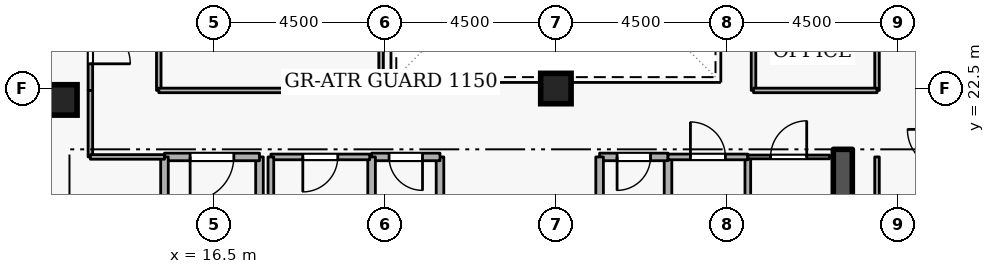
"""IFC4 building model, lengths in metres.
Left out: names, types, materials, properties, quantities, classifications, styles, units other than length and angle.
Written with IfcOpenShell. Run it as: python <this file> out.ifc"""

import sys

from ifc_helpers import new_model, si_unit, direction, frame, frame_2d, origin, origin_2d, place, context, subcontext, project, spatial, rectangle, extrude, element, fill, save


model = new_model("IFC4")
c1 = context("Model", 3, precision=1e-05, world=origin(), true_north=direction((0.0, 1.0)))
c2 = subcontext(c1, "Body", "Model", "MODEL_VIEW")
j1 = project(units=[si_unit("LENGTHUNIT", "METRE"), si_unit("PLANEANGLEUNIT", "RADIAN")], contexts=[c1])
p1 = place(None, origin())
s1 = spatial("IfcSite", under=j1, at=p1, CompositionType="ELEMENT")
p2 = place(p1, origin())
s2 = spatial("IfcBuilding", under=s1, at=p2, CompositionType="ELEMENT")
p3 = place(p2, frame((0.0, 0.0, 254.7)))
s3 = spatial("IfcBuildingStorey", under=s2, at=p3, CompositionType="ELEMENT", Elevation=254.7)
p4 = place(p3, frame((33.05, 15.1, 0.0), z_axis=(0.0, 0.0, 1.0), x_axis=(0.0, 1.0, 0.0)))
e1 = element("IfcWall", 1, at=p4, inside=s3, PredefinedType="SHEAR", context=c2, shape_type="SweptSolid", body=[
    extrude(rectangle(XDim=5.8, YDim=0.5, at=frame_2d((2.9, 0.0))), origin(), (0.0, 0.0, 1.0), 3.6),
])
for number, where, z_axis, x_axis in (
    (2, (12.5, 22.2, 0.0), (0.0, 0.0, 1.0), (1.0, 0.0, 0.0)),
    (3, (25.5, 22.5, 0.0), (0.0, 0.0, 1.0), (1.0, 0.0, 0.0)),
):
    element("IfcColumn", number, at=place(p3, frame(where, z_axis=z_axis, x_axis=x_axis)), inside=s3, PredefinedType="COLUMN", context=c2, shape_type="SweptSolid", body=[
        extrude(rectangle(XDim=0.8, YDim=0.8, at=origin_2d()), origin(), (0.0, 0.0, 1.0), 3.6),
    ])
p5 = place(p3, frame((17.7, 18.4, 0.0), z_axis=(0.0, 0.0, 1.0), x_axis=(0.0, 1.0, 0.0)))
e4 = element("IfcWall", 4, at=p5, inside=s3, PredefinedType="STANDARD", context=c2, shape_type="SweptSolid", body=[
    extrude(rectangle(XDim=2.3, YDim=0.2, at=frame_2d((1.15, 0.0))), origin(), (0.0, 0.0, 1.0), 2.525),
])
p6 = place(p3, frame((17.7, 20.7, 0.0), z_axis=(0.0, 0.0, 1.0), x_axis=(-1.0, 0.0, 0.0)))
e5 = element("IfcWall", 5, at=p6, inside=s3, PredefinedType="STANDARD", context=c2, shape_type="SweptSolid", body=[
    extrude(rectangle(XDim=2.5, YDim=0.2, at=frame_2d((1.25, 0.0))), origin(), (0.0, 0.0, 1.0), 3.32),
])
p7 = place(p6, frame((0.675, 0.0, 0.0)))
e6 = element("IfcOpeningElement", 6, at=p7, cuts=e5, PredefinedType="OPENING", context=c2, shape_type="SweptSolid", body=[
    extrude(rectangle(XDim=1.15, YDim=2.1, at=frame_2d((0.575, 1.05))), frame((0.0, 0.11, 0.0), z_axis=(0.0, -1.0, 0.0), x_axis=(1.0, 0.0, 0.0)), (0.0, 0.0, 1.0), 0.22),
])
p8 = place(p3, frame((15.2, 20.7, 0.0), z_axis=(0.0, 0.0, 1.0), x_axis=(0.0, -1.0, 0.0)))
e7 = element("IfcWall", 7, at=p8, inside=s3, PredefinedType="STANDARD", context=c2, shape_type="SweptSolid", body=[
    extrude(rectangle(XDim=5.7, YDim=0.2, at=frame_2d((2.85, 0.0))), origin(), (0.0, 0.0, 1.0), 3.32),
])
p9 = place(p3, frame((28.45, 18.65, 0.0), z_axis=(0.0, 0.0, 1.0), x_axis=(0.0, 1.0, 0.0)))
e8 = element("IfcWall", 8, at=p9, inside=s3, PredefinedType="STANDARD", context=c2, shape_type="SweptSolid", body=[
    extrude(rectangle(XDim=2.05, YDim=0.2, at=frame_2d((1.025, 0.0))), origin(), (0.0, 0.0, 1.0), 3.32),
])
p10 = place(p3, frame((28.45, 20.7, 0.0), z_axis=(0.0, 0.0, 1.0), x_axis=(-1.0, 0.0, 0.0)))
e9 = element("IfcWall", 9, at=p10, inside=s3, PredefinedType="STANDARD", context=c2, shape_type="SweptSolid", body=[
    extrude(rectangle(XDim=1.8, YDim=0.2, at=frame_2d((0.9, 0.0))), origin(), (0.0, 0.0, 1.0), 3.32),
])
p11 = place(p10, frame((0.46, 0.0, 0.0)))
e10 = element("IfcOpeningElement", 10, at=p11, cuts=e9, PredefinedType="OPENING", context=c2, shape_type="SweptSolid", body=[
    extrude(rectangle(XDim=0.88, YDim=2.04, at=frame_2d((0.44, 1.02))), frame((0.0, 0.11, 0.0), z_axis=(0.0, -1.0, 0.0), x_axis=(1.0, 0.0, 0.0)), (0.0, 0.0, 1.0), 0.22),
])
for number, where, z_axis, x_axis in (
    (11, (26.65, 20.7, 0.0), (0.0, 0.0, 1.0), (0.0, -1.0, 0.0)),
    (12, (22.45, 18.65, 0.0), (0.0, 0.0, 1.0), (0.0, 1.0, 0.0)),
):
    element("IfcWall", number, at=place(p3, frame(where, z_axis=z_axis, x_axis=x_axis)), inside=s3, PredefinedType="STANDARD", context=c2, shape_type="SweptSolid", body=[
        extrude(rectangle(XDim=2.05, YDim=0.2, at=frame_2d((1.025, 0.0))), origin(), (0.0, 0.0, 1.0), 3.32),
    ])
p12 = place(p3, frame((22.45, 20.7, 0.0), z_axis=(0.0, 0.0, 1.0), x_axis=(-1.0, 0.0, 0.0)))
e13 = element("IfcWall", 13, at=p12, inside=s3, PredefinedType="STANDARD", context=c2, shape_type="SweptSolid", body=[
    extrude(rectangle(XDim=1.8, YDim=0.2, at=frame_2d((0.9, 0.0))), origin(), (0.0, 0.0, 1.0), 3.32),
])
p13 = place(p12, frame((0.46, 0.0, 0.0)))
e14 = element("IfcOpeningElement", 14, at=p13, cuts=e13, PredefinedType="OPENING", context=c2, shape_type="SweptSolid", body=[
    extrude(rectangle(XDim=0.88, YDim=2.04, at=frame_2d((0.44, 1.02))), frame((0.0, 0.11, 0.0), z_axis=(0.0, -1.0, 0.0), x_axis=(1.0, 0.0, 0.0)), (0.0, 0.0, 1.0), 0.22),
])
p14 = place(p3, frame((20.65, 20.7, 0.0), z_axis=(0.0, 0.0, 1.0), x_axis=(0.0, -1.0, 0.0)))
e15 = element("IfcWall", 15, at=p14, inside=s3, PredefinedType="STANDARD", context=c2, shape_type="SweptSolid", body=[
    extrude(rectangle(XDim=2.05, YDim=0.2, at=frame_2d((1.025, 0.0))), origin(), (0.0, 0.0, 1.0), 3.32),
])
p15 = place(p3, frame((20.6, 20.7, 0.0), z_axis=(0.0, 0.0, 1.0), x_axis=(-1.0, 0.0, 0.0)))
e16 = element("IfcWall", 16, at=p15, inside=s3, PredefinedType="PARTITIONING", context=c2, shape_type="SweptSolid", body=[
    extrude(rectangle(XDim=2.6, YDim=0.15, at=frame_2d((1.3, 0.0))), origin(), (0.0, 0.0, 1.0), 3.32),
])
p16 = place(p15, frame((0.84, 0.0, 0.0)))
e17 = element("IfcOpeningElement", 17, at=p16, cuts=e16, PredefinedType="OPENING", context=c2, shape_type="SweptSolid", body=[
    extrude(rectangle(XDim=0.92, YDim=2.08, at=frame_2d((0.46, 1.04))), frame((0.0, 0.085, 0.0), z_axis=(0.0, -1.0, 0.0), x_axis=(1.0, 0.0, 0.0)), (0.0, 0.0, 1.0), 0.17),
])
p17 = place(p3, frame((18.0, 20.7, 0.0), z_axis=(0.0, 0.0, 1.0), x_axis=(0.0, -1.0, 0.0)))
e18 = element("IfcWall", 18, at=p17, inside=s3, PredefinedType="PARTITIONING", context=c2, shape_type="SweptSolid", body=[
    extrude(rectangle(XDim=2.05, YDim=0.15, at=frame_2d((1.025, 0.0))), origin(), (0.0, 0.0, 1.0), 2.525),
])
p18 = place(p3, frame((30.55, 20.7, 0.0), z_axis=(0.0, 0.0, 1.0), x_axis=(0.0, -1.0, 0.0)))
e19 = element("IfcWall", 19, at=p18, inside=s3, PredefinedType="PARTITIONING", context=c2, shape_type="SweptSolid", body=[
    extrude(rectangle(XDim=2.05, YDim=0.15, at=frame_2d((1.025, 0.0))), origin(), (0.0, 0.0, 1.0), 3.32),
])
p19 = place(p3, frame((28.45, 20.7, 0.0), z_axis=(0.0, 0.0, 1.0), x_axis=(1.0, 0.0, 0.0)))
e20 = element("IfcWall", 20, at=p19, inside=s3, PredefinedType="PARTITIONING", context=c2, shape_type="SweptSolid", body=[
    extrude(rectangle(XDim=2.1, YDim=0.15, at=frame_2d((1.05, 0.0))), origin(), (0.0, 0.0, 1.0), 3.32),
])
p20 = place(p19, frame((0.59, 0.0, 0.0)))
e21 = element("IfcOpeningElement", 21, at=p20, cuts=e20, PredefinedType="OPENING", context=c2, shape_type="SweptSolid", body=[
    extrude(rectangle(XDim=0.92, YDim=2.08, at=frame_2d((0.46, 1.04))), frame((0.0, 0.085, 0.0), z_axis=(0.0, -1.0, 0.0), x_axis=(1.0, 0.0, 0.0)), (0.0, 0.0, 1.0), 0.17),
])
p21 = place(p3, frame((30.55, 20.7, 0.0), z_axis=(0.0, 0.0, 1.0), x_axis=(1.0, 0.0, 0.0)))
e22 = element("IfcWall", 22, at=p21, inside=s3, PredefinedType="PARTITIONING", context=c2, shape_type="SweptSolid", body=[
    extrude(rectangle(XDim=2.15, YDim=0.1, at=frame_2d((1.075, 0.0))), origin(), (0.0, 0.0, 1.0), 3.32),
])
p22 = place(p21, frame((0.6, 0.0, 0.0)))
e23 = element("IfcOpeningElement", 23, at=p22, cuts=e22, PredefinedType="OPENING", context=c2, shape_type="SweptSolid", body=[
    extrude(rectangle(XDim=0.95, YDim=2.1, at=frame_2d((0.475, 1.05))), frame((0.0, 0.06, 0.0), z_axis=(0.0, -1.0, 0.0), x_axis=(1.0, 0.0, 0.0)), (0.0, 0.0, 1.0), 0.12),
])
p23 = place(p3, frame((33.95, 20.7, 0.0), z_axis=(0.0, 0.0, 1.0), x_axis=(0.0, -1.0, 0.0)))
e24 = element("IfcWall", 24, at=p23, inside=s3, PredefinedType="PARTITIONING", context=c2, shape_type="SweptSolid", body=[
    extrude(rectangle(XDim=5.9, YDim=0.12, at=frame_2d((2.95, 0.0))), origin(), (0.0, 0.0, 1.0), 3.32),
])
p24 = place(p3, frame((13.25, 24.9, 0.0), z_axis=(0.0, 0.0, 1.0), x_axis=(0.0, -1.0, 0.0)))
e25 = element("IfcWall", 25, at=p24, inside=s3, PredefinedType="PARTITIONING", context=c2, shape_type="SweptSolid", body=[
    extrude(rectangle(XDim=2.45, YDim=0.12, at=frame_2d((1.225, 0.0))), origin(), (0.0, 0.0, 1.0), 3.32),
])
p25 = place(p24, frame((0.7, 0.0, 0.0)))
e26 = element("IfcOpeningElement", 26, at=p25, cuts=e25, PredefinedType="OPENING", context=c2, shape_type="SweptSolid", body=[
    extrude(rectangle(XDim=1.05, YDim=2.1, at=frame_2d((0.525, 1.05))), frame((0.0, 0.07, 0.0), z_axis=(0.0, -1.0, 0.0), x_axis=(1.0, 0.0, 0.0)), (0.0, 0.0, 1.0), 0.14),
])
p26 = place(p3, frame((13.25, 22.45, 0.0), z_axis=(0.0, 0.0, 1.0), x_axis=(0.0, -1.0, 0.0)))
e27 = element("IfcWall", 27, at=p26, inside=s3, PredefinedType="PARTITIONING", context=c2, shape_type="SweptSolid", body=[
    extrude(rectangle(XDim=1.75, YDim=0.12, at=frame_2d((0.875, 0.0))), origin(), (0.0, 0.0, 1.0), 3.32),
])
p27 = place(p3, frame((13.25, 20.7, 0.0), z_axis=(0.0, 0.0, 1.0), x_axis=(1.0, 0.0, 0.0)))
e28 = element("IfcWall", 28, at=p27, inside=s3, PredefinedType="PARTITIONING", context=c2, shape_type="SweptSolid", body=[
    extrude(rectangle(XDim=1.95, YDim=0.12, at=frame_2d((0.975, 0.0))), origin(), (0.0, 0.0, 1.0), 3.32),
])
p28 = place(p3, frame((15.05, 22.45, 0.0), z_axis=(0.0, 0.0, 1.0), x_axis=(0.0, 1.0, 0.0)))
e29 = element("IfcWall", 29, at=p28, inside=s3, PredefinedType="PARTITIONING", context=c2, shape_type="SweptSolid", body=[
    extrude(rectangle(XDim=9.1, YDim=0.12, at=frame_2d((4.55, 0.0))), origin(), (0.0, 0.0, 1.0), 3.32),
])
p29 = place(p28, frame((4.075, 0.0, 0.0)))
e30 = element("IfcOpeningElement", 30, at=p29, cuts=e29, PredefinedType="OPENING", context=c2, shape_type="SweptSolid", body=[
    extrude(rectangle(XDim=0.95, YDim=2.1, at=frame_2d((0.475, 1.05))), frame((0.0, 0.07, 0.0), z_axis=(0.0, -1.0, 0.0), x_axis=(1.0, 0.0, 0.0)), (0.0, 0.0, 1.0), 0.14),
])
p30 = place(p3, frame((20.9, 31.55, 0.0), z_axis=(0.0, 0.0, 1.0), x_axis=(0.0, -1.0, 0.0)))
e31 = element("IfcWall", 31, at=p30, inside=s3, PredefinedType="PARTITIONING", context=c2, shape_type="SweptSolid", body=[
    extrude(rectangle(XDim=9.1, YDim=0.12, at=frame_2d((4.55, 0.0))), origin(), (0.0, 0.0, 1.0), 3.32),
])
p31 = place(p3, frame((20.9, 22.45, 0.0), z_axis=(0.0, 0.0, 1.0), x_axis=(-1.0, 0.0, 0.0)))
e32 = element("IfcWall", 32, at=p31, inside=s3, PredefinedType="PARTITIONING", context=c2, shape_type="SweptSolid", body=[
    extrude(rectangle(XDim=5.85, YDim=0.12, at=frame_2d((2.925, 0.0))), origin(), (0.0, 0.0, 1.0), 3.32),
])
p32 = place(p3, frame((30.7, 22.45, 0.0), z_axis=(0.0, 0.0, 1.0), x_axis=(0.0, 1.0, 0.0)))
e33 = element("IfcWall", 33, at=p32, inside=s3, PredefinedType="PARTITIONING", context=c2, shape_type="SweptSolid", body=[
    extrude(rectangle(XDim=9.1, YDim=0.12, at=frame_2d((4.55, 0.0))), origin(), (0.0, 0.0, 1.0), 3.32),
])
p33 = place(p3, frame((33.95, 31.55, 0.0), z_axis=(0.0, 0.0, 1.0), x_axis=(0.0, -1.0, 0.0)))
e34 = element("IfcWall", 34, at=p33, inside=s3, PredefinedType="PARTITIONING", context=c2, shape_type="SweptSolid", body=[
    extrude(rectangle(XDim=9.1, YDim=0.12, at=frame_2d((4.55, 0.0))), origin(), (0.0, 0.0, 1.0), 3.32),
])
p34 = place(p33, frame((4.075, 0.0, 0.0)))
e35 = element("IfcOpeningElement", 35, at=p34, cuts=e34, PredefinedType="OPENING", context=c2, shape_type="SweptSolid", body=[
    extrude(rectangle(XDim=0.95, YDim=2.1, at=frame_2d((0.475, 1.05))), frame((0.0, 0.07, 0.0), z_axis=(0.0, -1.0, 0.0), x_axis=(1.0, 0.0, 0.0)), (0.0, 0.0, 1.0), 0.14),
])
p35 = place(p3, frame((33.95, 22.45, 0.0), z_axis=(0.0, 0.0, 1.0), x_axis=(-1.0, 0.0, 0.0)))
e36 = element("IfcWall", 36, at=p35, inside=s3, PredefinedType="PARTITIONING", context=c2, shape_type="SweptSolid", body=[
    extrude(rectangle(XDim=3.25, YDim=0.12, at=frame_2d((1.625, 0.0))), origin(), (0.0, 0.0, 1.0), 3.32),
])
p36 = place(p7, origin())
e37 = element("IfcDoor", 37, at=p36, inside=s3, OperationType="SINGLE_SWING_RIGHT", PredefinedType="DOOR", context=c2, shape_type="SweptSolid", body=[
    extrude(rectangle(XDim=1.15, YDim=2.1, at=frame_2d((0.575, 1.05))), frame((0.0, 0.025, 0.0), z_axis=(0.0, -1.0, 0.0), x_axis=(1.0, 0.0, 0.0)), (0.0, 0.0, 1.0), 0.05),
])
fill(e6, e37)
p37 = place(p11, origin())
e38 = element("IfcDoor", 38, at=p37, inside=s3, OperationType="SINGLE_SWING_RIGHT", PredefinedType="DOOR", context=c2, shape_type="SweptSolid", body=[
    extrude(rectangle(XDim=0.88, YDim=2.04, at=frame_2d((0.44, 1.02))), frame((0.0, 0.025, 0.0), z_axis=(0.0, -1.0, 0.0), x_axis=(1.0, 0.0, 0.0)), (0.0, 0.0, 1.0), 0.05),
])
fill(e10, e38)
p38 = place(p13, origin())
e39 = element("IfcDoor", 39, at=p38, inside=s3, OperationType="SINGLE_SWING_LEFT", PredefinedType="DOOR", context=c2, shape_type="SweptSolid", body=[
    extrude(rectangle(XDim=0.88, YDim=2.04, at=frame_2d((0.44, 1.02))), frame((0.0, 0.025, 0.0), z_axis=(0.0, -1.0, 0.0), x_axis=(1.0, 0.0, 0.0)), (0.0, 0.0, 1.0), 0.05),
])
fill(e14, e39)
p39 = place(p16, origin())
e40 = element("IfcDoor", 40, at=p39, inside=s3, OperationType="SINGLE_SWING_RIGHT", PredefinedType="DOOR", context=c2, shape_type="SweptSolid", body=[
    extrude(rectangle(XDim=0.92, YDim=2.08, at=frame_2d((0.46, 1.04))), frame((0.0, 0.025, 0.0), z_axis=(0.0, -1.0, 0.0), x_axis=(1.0, 0.0, 0.0)), (0.0, 0.0, 1.0), 0.05),
])
fill(e17, e40)
p40 = place(p20, origin())
e41 = element("IfcDoor", 41, at=p40, inside=s3, OperationType="SINGLE_SWING_LEFT", PredefinedType="DOOR", context=c2, shape_type="SweptSolid", body=[
    extrude(rectangle(XDim=0.92, YDim=2.08, at=frame_2d((0.46, 1.04))), frame((0.0, 0.025, 0.0), z_axis=(0.0, -1.0, 0.0), x_axis=(1.0, 0.0, 0.0)), (0.0, 0.0, 1.0), 0.05),
])
fill(e21, e41)
p41 = place(p22, origin())
e42 = element("IfcDoor", 42, at=p41, inside=s3, OperationType="SINGLE_SWING_RIGHT", PredefinedType="DOOR", context=c2, shape_type="SweptSolid", body=[
    extrude(rectangle(XDim=0.95, YDim=2.1, at=frame_2d((0.475, 1.05))), frame((0.0, 0.025, 0.0), z_axis=(0.0, -1.0, 0.0), x_axis=(1.0, 0.0, 0.0)), (0.0, 0.0, 1.0), 0.05),
])
fill(e23, e42)
p42 = place(p25, origin())
e43 = element("IfcDoor", 43, at=p42, inside=s3, OperationType="SINGLE_SWING_RIGHT", PredefinedType="DOOR", context=c2, shape_type="SweptSolid", body=[
    extrude(rectangle(XDim=1.05, YDim=2.1, at=frame_2d((0.525, 1.05))), frame((0.0, 0.025, 0.0), z_axis=(0.0, -1.0, 0.0), x_axis=(1.0, 0.0, 0.0)), (0.0, 0.0, 1.0), 0.05),
])
fill(e26, e43)
save(model, sys.argv[1])
